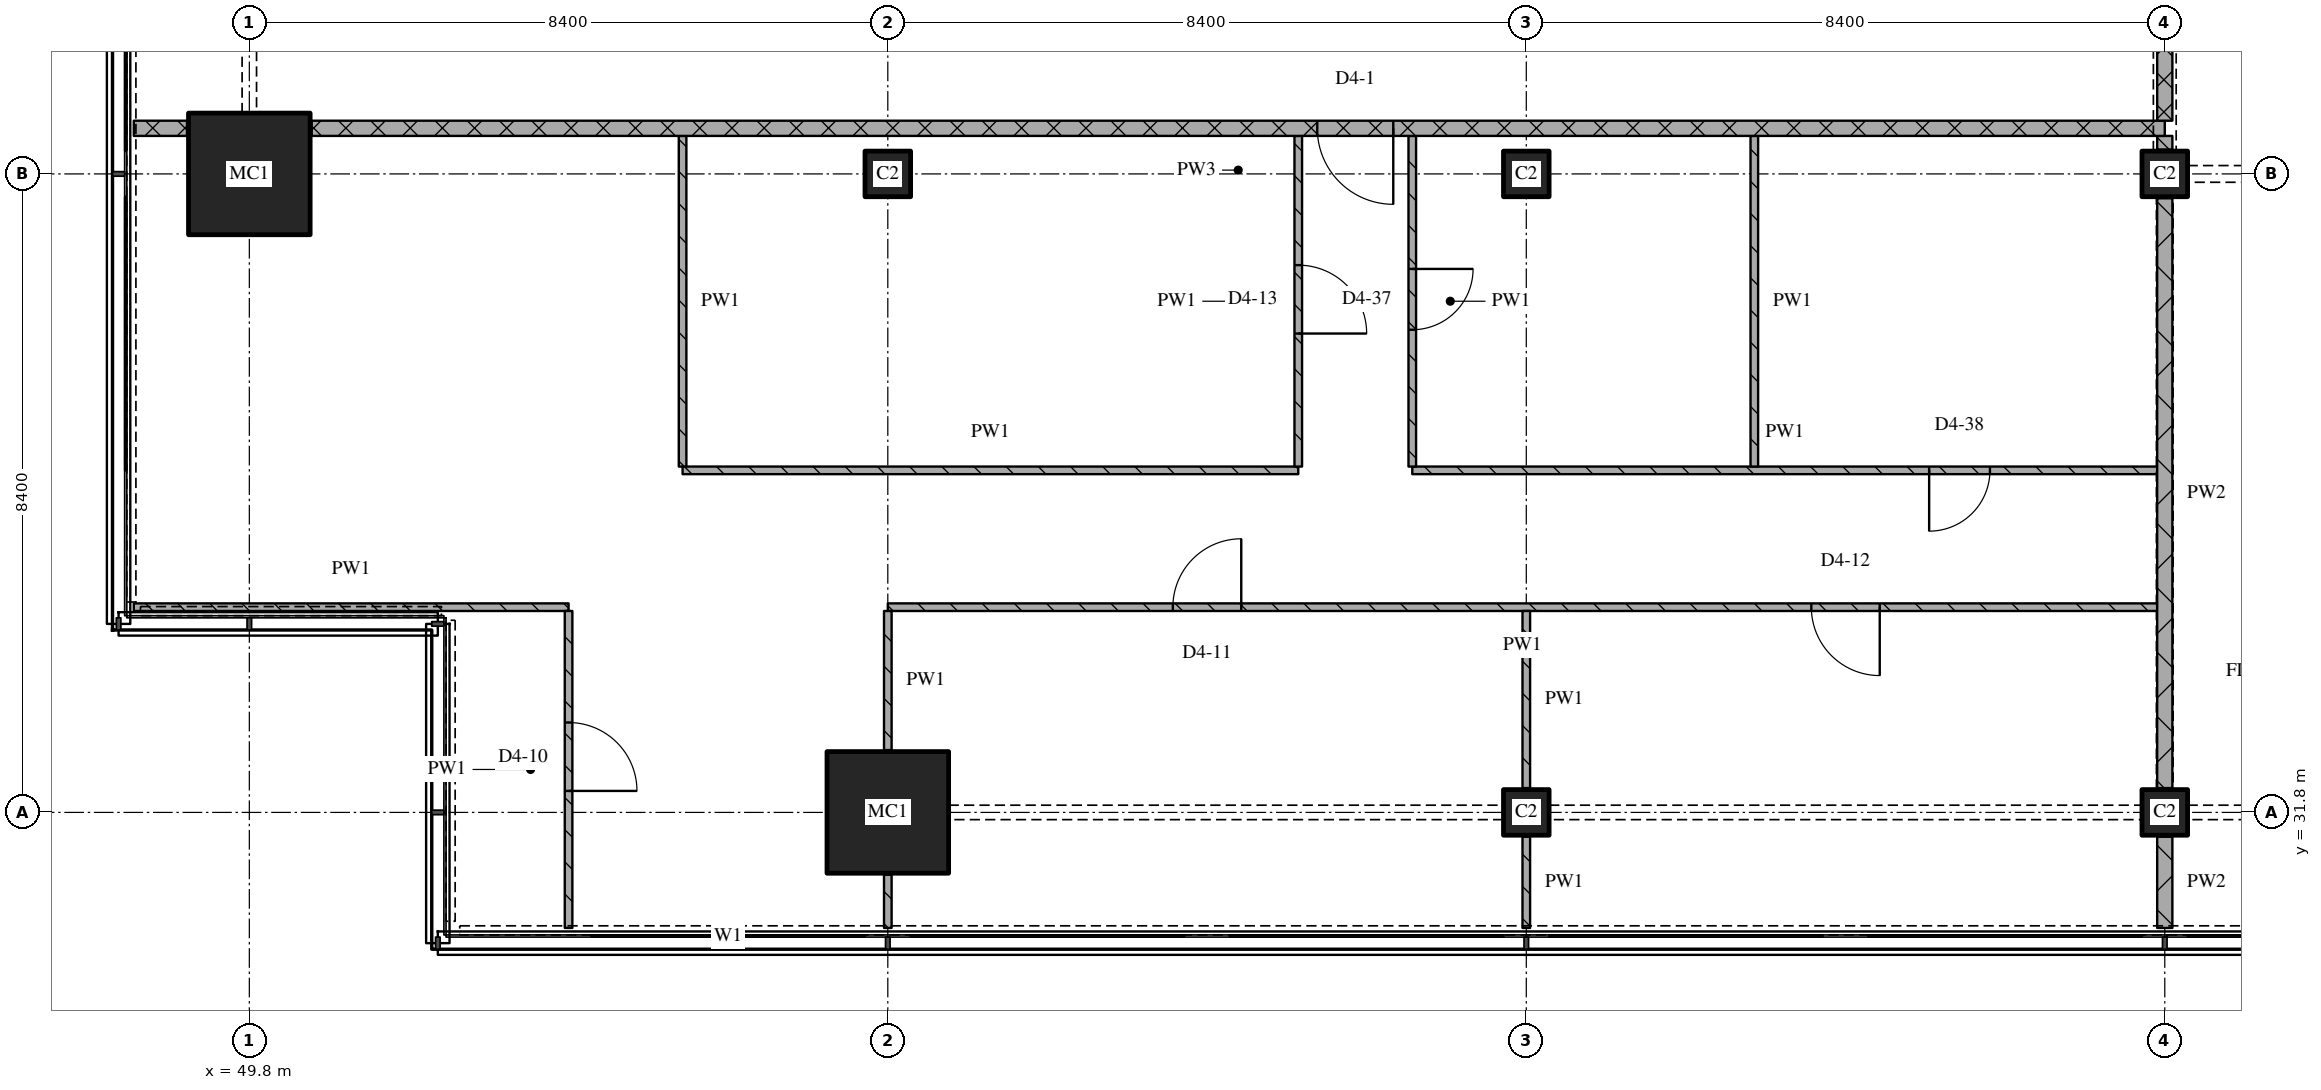
"""IFC4 building model, lengths in metres.
Left out: names, types, materials, properties, quantities, classifications, styles, units other than length and angle.
Written with IfcOpenShell. Run it as: python <this file> out.ifc"""

import sys

from ifc_helpers import new_model, si_unit, direction, frame, frame_2d, origin, origin_2d, place, context, subcontext, project, spatial, rectangle, extrude, element, fill, save


model = new_model("IFC4")
c1 = context("Model", 3, precision=1e-05, world=origin(), true_north=direction((0.0, 1.0)))
c2 = subcontext(c1, "Body", "Model", "MODEL_VIEW")
j1 = project(units=[si_unit("LENGTHUNIT", "METRE"), si_unit("PLANEANGLEUNIT", "RADIAN")], contexts=[c1])
p1 = place(None, origin())
s1 = spatial("IfcSite", under=j1, at=p1, CompositionType="ELEMENT")
p2 = place(p1, origin())
s2 = spatial("IfcBuilding", under=s1, at=p2, CompositionType="ELEMENT")
p3 = place(p2, frame((0.0, 0.0, 237.9)))
s3 = spatial("IfcBuildingStorey", under=s2, at=p3, CompositionType="ELEMENT", Elevation=237.9)
for number, where, z_axis, x_axis in (
    (1, (49.8, 40.2, 0.0), (0.0, 0.0, 1.0), (1.0, 0.0, 0.0)),
    (2, (58.2, 31.8, 0.0), (0.0, 0.0, 1.0), (1.0, 0.0, 0.0)),
):
    element("IfcColumn", number, at=place(p3, frame(where, z_axis=z_axis, x_axis=x_axis)), inside=s3, PredefinedType="COLUMN", context=c2, shape_type="SweptSolid", body=[
        extrude(rectangle(XDim=1.6, YDim=1.6, at=origin_2d()), origin(), (0.0, 0.0, 1.0), 3.6),
    ])
for number, where, z_axis, x_axis in (
    (3, (58.2, 40.2, 0.0), (0.0, 0.0, 1.0), (1.0, 0.0, 0.0)),
    (4, (66.6, 31.8, 0.0), (0.0, 0.0, 1.0), (1.0, 0.0, 0.0)),
    (5, (66.6, 40.2, 0.0), (0.0, 0.0, 1.0), (1.0, 0.0, 0.0)),
    (6, (75.0, 31.8, 0.0), (0.0, 0.0, 1.0), (1.0, 0.0, 0.0)),
    (7, (75.0, 40.2, 0.0), (0.0, 0.0, 1.0), (1.0, 0.0, 0.0)),
):
    element("IfcColumn", number, at=place(p3, frame(where, z_axis=z_axis, x_axis=x_axis)), inside=s3, PredefinedType="COLUMN", context=c2, shape_type="SweptSolid", body=[
        extrude(rectangle(XDim=0.6, YDim=0.6, at=origin_2d()), origin(), (0.0, 0.0, 1.0), 3.6),
    ])
p4 = place(p3, frame((48.28, 34.5, 0.0), z_axis=(0.0, 0.0, 1.0), x_axis=(1.0, 0.0, 0.0)))
e8 = element("IfcWall", 8, at=p4, inside=s3, PredefinedType="PARTITIONING", context=c2, shape_type="SweptSolid", body=[
    extrude(rectangle(XDim=5.72, YDim=0.1, at=frame_2d((2.86, 0.0))), origin(), (0.0, 0.0, 1.0), 3.32),
])
p5 = place(p3, frame((74.9, 34.5, 0.0), z_axis=(0.0, 0.0, 1.0), x_axis=(-1.0, 0.0, 0.0)))
e9 = element("IfcWall", 9, at=p5, inside=s3, PredefinedType="PARTITIONING", context=c2, shape_type="SweptSolid", body=[
    extrude(rectangle(XDim=16.7, YDim=0.1, at=frame_2d((8.35, 0.0))), origin(), (0.0, 0.0, 1.0), 3.32),
])
p6 = place(p5, frame((3.65, 0.0, 0.0)))
e10 = element("IfcOpeningElement", 10, at=p6, cuts=e9, PredefinedType="OPENING", context=c2, shape_type="SweptSolid", body=[
    extrude(rectangle(XDim=0.9, YDim=2.1, at=frame_2d((0.45, 1.05))), frame((0.0, 0.06, 0.0), z_axis=(0.0, -1.0, 0.0), x_axis=(1.0, 0.0, 0.0)), (0.0, 0.0, 1.0), 0.12),
])
p7 = place(p5, frame((12.05, 0.0, 0.0)))
e11 = element("IfcOpeningElement", 11, at=p7, cuts=e9, PredefinedType="OPENING", context=c2, shape_type="SweptSolid", body=[
    extrude(rectangle(XDim=0.9, YDim=2.1, at=frame_2d((0.45, 1.05))), frame((0.0, 0.06, 0.0), z_axis=(0.0, -1.0, 0.0), x_axis=(1.0, 0.0, 0.0)), (0.0, 0.0, 1.0), 0.12),
])
p8 = place(p3, frame((55.5, 36.3, 0.0), z_axis=(0.0, 0.0, 1.0), x_axis=(1.0, 0.0, 0.0)))
e12 = element("IfcWall", 12, at=p8, inside=s3, PredefinedType="PARTITIONING", context=c2, shape_type="SweptSolid", body=[
    extrude(rectangle(XDim=8.1, YDim=0.1, at=frame_2d((4.05, 0.0))), origin(), (0.0, 0.0, 1.0), 3.32),
])
p9 = place(p3, frame((65.1, 36.3, 0.0), z_axis=(0.0, 0.0, 1.0), x_axis=(1.0, 0.0, 0.0)))
e13 = element("IfcWall", 13, at=p9, inside=s3, PredefinedType="PARTITIONING", context=c2, shape_type="SweptSolid", body=[
    extrude(rectangle(XDim=9.8, YDim=0.1, at=frame_2d((4.9, 0.0))), origin(), (0.0, 0.0, 1.0), 3.32),
])
p10 = place(p9, frame((6.8, 0.0, 0.0)))
e14 = element("IfcOpeningElement", 14, at=p10, cuts=e13, PredefinedType="OPENING", context=c2, shape_type="SweptSolid", body=[
    extrude(rectangle(XDim=0.8, YDim=2.1, at=frame_2d((0.4, 1.05))), frame((0.0, 0.06, 0.0), z_axis=(0.0, -1.0, 0.0), x_axis=(1.0, 0.0, 0.0)), (0.0, 0.0, 1.0), 0.12),
])
p11 = place(p3, frame((48.28, 40.8, 0.0), z_axis=(0.0, 0.0, 1.0), x_axis=(1.0, 0.0, 0.0)))
e15 = element("IfcWall", 15, at=p11, inside=s3, PredefinedType="PARTITIONING", context=c2, shape_type="SweptSolid", body=[
    extrude(rectangle(XDim=0.7, YDim=0.2, at=frame_2d((0.35, 0.0))), origin(), (0.0, 0.0, 1.0), 3.32),
])
p12 = place(p3, frame((75.0, 40.8, 0.0), z_axis=(0.0, 0.0, 1.0), x_axis=(-1.0, 0.0, 0.0)))
e16 = element("IfcWall", 16, at=p12, inside=s3, PredefinedType="PARTITIONING", context=c2, shape_type="SweptSolid", body=[
    extrude(rectangle(XDim=24.38, YDim=0.2, at=frame_2d((12.19, 0.0))), origin(), (0.0, 0.0, 1.0), 3.32),
])
p13 = place(p12, frame((10.15, 0.0, 0.0)))
e17 = element("IfcOpeningElement", 17, at=p13, cuts=e16, PredefinedType="OPENING", context=c2, shape_type="SweptSolid", body=[
    extrude(rectangle(XDim=1.0, YDim=2.1, at=frame_2d((0.5, 1.05))), frame((0.0, 0.11, 0.0), z_axis=(0.0, -1.0, 0.0), x_axis=(1.0, 0.0, 0.0)), (0.0, 0.0, 1.0), 0.22),
])
p14 = place(p3, frame((54.0, 30.28, 0.0), z_axis=(0.0, 0.0, 1.0), x_axis=(0.0, 1.0, 0.0)))
e18 = element("IfcWall", 18, at=p14, inside=s3, PredefinedType="PARTITIONING", context=c2, shape_type="SweptSolid", body=[
    extrude(rectangle(XDim=4.17, YDim=0.1, at=frame_2d((2.085, 0.0))), origin(), (0.0, 0.0, 1.0), 3.32),
])
p15 = place(p14, frame((1.803, 0.0, 0.0)))
e19 = element("IfcOpeningElement", 19, at=p15, cuts=e18, PredefinedType="OPENING", context=c2, shape_type="SweptSolid", body=[
    extrude(rectangle(XDim=0.9, YDim=2.1, at=frame_2d((0.45, 1.05))), frame((0.0, 0.06, 0.0), z_axis=(0.0, -1.0, 0.0), x_axis=(1.0, 0.0, 0.0)), (0.0, 0.0, 1.0), 0.12),
])
p16 = place(p3, frame((55.5, 40.7, 0.0), z_axis=(0.0, 0.0, 1.0), x_axis=(0.0, -1.0, 0.0)))
e20 = element("IfcWall", 20, at=p16, inside=s3, PredefinedType="PARTITIONING", context=c2, shape_type="SweptSolid", body=[
    extrude(rectangle(XDim=4.35, YDim=0.1, at=frame_2d((2.175, 0.0))), origin(), (0.0, 0.0, 1.0), 3.32),
])
p17 = place(p3, frame((58.2, 30.98, 0.0), z_axis=(0.0, 0.0, 1.0), x_axis=(0.0, -1.0, 0.0)))
e21 = element("IfcWall", 21, at=p17, inside=s3, PredefinedType="PARTITIONING", context=c2, shape_type="SweptSolid", body=[
    extrude(rectangle(XDim=0.7, YDim=0.1, at=frame_2d((0.35, 0.0))), origin(), (0.0, 0.0, 1.0), 3.32),
])
p18 = place(p3, frame((58.2, 34.45, 0.0), z_axis=(0.0, 0.0, 1.0), x_axis=(0.0, -1.0, 0.0)))
e22 = element("IfcWall", 22, at=p18, inside=s3, PredefinedType="PARTITIONING", context=c2, shape_type="SweptSolid", body=[
    extrude(rectangle(XDim=1.83, YDim=0.1, at=frame_2d((0.915, 0.0))), origin(), (0.0, 0.0, 1.0), 3.32),
])
p19 = place(p3, frame((63.6, 36.35, 0.0), z_axis=(0.0, 0.0, 1.0), x_axis=(0.0, 1.0, 0.0)))
e23 = element("IfcWall", 23, at=p19, inside=s3, PredefinedType="PARTITIONING", context=c2, shape_type="SweptSolid", body=[
    extrude(rectangle(XDim=4.35, YDim=0.1, at=frame_2d((2.175, 0.0))), origin(), (0.0, 0.0, 1.0), 3.32),
])
p20 = place(p19, frame((1.75, 0.0, 0.0)))
e24 = element("IfcOpeningElement", 24, at=p20, cuts=e23, PredefinedType="OPENING", context=c2, shape_type="SweptSolid", body=[
    extrude(rectangle(XDim=0.9, YDim=2.1, at=frame_2d((0.45, 1.05))), frame((0.0, 0.06, 0.0), z_axis=(0.0, -1.0, 0.0), x_axis=(1.0, 0.0, 0.0)), (0.0, 0.0, 1.0), 0.12),
])
p21 = place(p3, frame((65.1, 40.7, 0.0), z_axis=(0.0, 0.0, 1.0), x_axis=(0.0, -1.0, 0.0)))
e25 = element("IfcWall", 25, at=p21, inside=s3, PredefinedType="PARTITIONING", context=c2, shape_type="SweptSolid", body=[
    extrude(rectangle(XDim=4.35, YDim=0.1, at=frame_2d((2.175, 0.0))), origin(), (0.0, 0.0, 1.0), 3.32),
])
p22 = place(p21, frame((1.75, 0.0, 0.0)))
e26 = element("IfcOpeningElement", 26, at=p22, cuts=e25, PredefinedType="OPENING", context=c2, shape_type="SweptSolid", body=[
    extrude(rectangle(XDim=0.8, YDim=2.1, at=frame_2d((0.4, 1.05))), frame((0.0, 0.06, 0.0), z_axis=(0.0, -1.0, 0.0), x_axis=(1.0, 0.0, 0.0)), (0.0, 0.0, 1.0), 0.12),
])
p23 = place(p3, frame((66.6, 31.48, 0.0), z_axis=(0.0, 0.0, 1.0), x_axis=(0.0, -1.0, 0.0)))
e27 = element("IfcWall", 27, at=p23, inside=s3, PredefinedType="PARTITIONING", context=c2, shape_type="SweptSolid", body=[
    extrude(rectangle(XDim=1.2, YDim=0.1, at=frame_2d((0.6, 0.0))), origin(), (0.0, 0.0, 1.0), 3.32),
])
p24 = place(p3, frame((66.6, 34.45, 0.0), z_axis=(0.0, 0.0, 1.0), x_axis=(0.0, -1.0, 0.0)))
e28 = element("IfcWall", 28, at=p24, inside=s3, PredefinedType="PARTITIONING", context=c2, shape_type="SweptSolid", body=[
    extrude(rectangle(XDim=2.33, YDim=0.1, at=frame_2d((1.165, 0.0))), origin(), (0.0, 0.0, 1.0), 3.32),
])
p25 = place(p3, frame((69.6, 40.7, 0.0), z_axis=(0.0, 0.0, 1.0), x_axis=(0.0, -1.0, 0.0)))
e29 = element("IfcWall", 29, at=p25, inside=s3, PredefinedType="PARTITIONING", context=c2, shape_type="SweptSolid", body=[
    extrude(rectangle(XDim=4.35, YDim=0.1, at=frame_2d((2.175, 0.0))), origin(), (0.0, 0.0, 1.0), 3.32),
])
p26 = place(p3, frame((75.0, 43.1, 0.0), z_axis=(0.0, 0.0, 1.0), x_axis=(0.0, -1.0, 0.0)))
e30 = element("IfcWall", 30, at=p26, inside=s3, PredefinedType="PARTITIONING", context=c2, shape_type="SweptSolid", body=[
    extrude(rectangle(XDim=2.2, YDim=0.2, at=frame_2d((1.1, 0.0))), origin(), (0.0, 0.0, 1.0), 2.53),
])
p27 = place(p3, frame((75.0, 31.48, 0.0), z_axis=(0.0, 0.0, 1.0), x_axis=(0.0, -1.0, 0.0)))
e31 = element("IfcWall", 31, at=p27, inside=s3, PredefinedType="PARTITIONING", context=c2, shape_type="SweptSolid", body=[
    extrude(rectangle(XDim=1.2, YDim=0.2, at=frame_2d((0.6, 0.0))), origin(), (0.0, 0.0, 1.0), 3.32),
])
p28 = place(p3, frame((75.0, 39.88, 0.0), z_axis=(0.0, 0.0, 1.0), x_axis=(0.0, -1.0, 0.0)))
e32 = element("IfcWall", 32, at=p28, inside=s3, PredefinedType="PARTITIONING", context=c2, shape_type="SweptSolid", body=[
    extrude(rectangle(XDim=7.76, YDim=0.2, at=frame_2d((3.88, 0.0))), origin(), (0.0, 0.0, 1.0), 2.72),
])
p29 = place(p3, frame((75.0, 40.7, 0.0), z_axis=(0.0, 0.0, 1.0), x_axis=(0.0, -1.0, 0.0)))
e33 = element("IfcWall", 33, at=p29, inside=s3, PredefinedType="PARTITIONING", context=c2, shape_type="SweptSolid", body=[
    extrude(rectangle(XDim=0.18, YDim=0.2, at=frame_2d((0.09, 0.0))), origin(), (0.0, 0.0, 1.0), 3.32),
])
p30 = place(p6, origin())
e34 = element("IfcDoor", 34, at=p30, inside=s3, OperationType="SINGLE_SWING_LEFT", PredefinedType="DOOR", context=c2, shape_type="SweptSolid", body=[
    extrude(rectangle(XDim=0.9, YDim=2.1, at=frame_2d((0.45, 1.05))), frame((0.0, 0.025, 0.0), z_axis=(0.0, -1.0, 0.0), x_axis=(1.0, 0.0, 0.0)), (0.0, 0.0, 1.0), 0.05),
])
fill(e10, e34)
p31 = place(p7, origin())
e35 = element("IfcDoor", 35, at=p31, inside=s3, OperationType="SINGLE_SWING_RIGHT", PredefinedType="DOOR", context=c2, shape_type="SweptSolid", body=[
    extrude(rectangle(XDim=0.9, YDim=2.1, at=frame_2d((0.45, 1.05))), frame((0.0, 0.025, 0.0), z_axis=(0.0, -1.0, 0.0), x_axis=(1.0, 0.0, 0.0)), (0.0, 0.0, 1.0), 0.05),
])
fill(e11, e35)
p32 = place(p10, origin())
e36 = element("IfcDoor", 36, at=p32, inside=s3, OperationType="SINGLE_SWING_RIGHT", PredefinedType="DOOR", context=c2, shape_type="SweptSolid", body=[
    extrude(rectangle(XDim=0.8, YDim=2.1, at=frame_2d((0.4, 1.05))), frame((0.0, 0.025, 0.0), z_axis=(0.0, -1.0, 0.0), x_axis=(1.0, 0.0, 0.0)), (0.0, 0.0, 1.0), 0.05),
])
fill(e14, e36)
p33 = place(p13, origin())
e37 = element("IfcDoor", 37, at=p33, inside=s3, OperationType="SINGLE_SWING_LEFT", PredefinedType="DOOR", context=c2, shape_type="SweptSolid", body=[
    extrude(rectangle(XDim=1.0, YDim=2.1, at=frame_2d((0.5, 1.05))), frame((0.0, 0.025, 0.0), z_axis=(0.0, -1.0, 0.0), x_axis=(1.0, 0.0, 0.0)), (0.0, 0.0, 1.0), 0.05),
])
fill(e17, e37)
p34 = place(p15, origin())
e38 = element("IfcDoor", 38, at=p34, inside=s3, OperationType="SINGLE_SWING_RIGHT", PredefinedType="DOOR", context=c2, shape_type="SweptSolid", body=[
    extrude(rectangle(XDim=0.9, YDim=2.1, at=frame_2d((0.45, 1.05))), frame((0.0, 0.025, 0.0), z_axis=(0.0, -1.0, 0.0), x_axis=(1.0, 0.0, 0.0)), (0.0, 0.0, 1.0), 0.05),
])
fill(e19, e38)
p35 = place(p20, origin())
e39 = element("IfcDoor", 39, at=p35, inside=s3, OperationType="SINGLE_SWING_RIGHT", PredefinedType="DOOR", context=c2, shape_type="SweptSolid", body=[
    extrude(rectangle(XDim=0.9, YDim=2.1, at=frame_2d((0.45, 1.05))), frame((0.0, 0.025, 0.0), z_axis=(0.0, -1.0, 0.0), x_axis=(1.0, 0.0, 0.0)), (0.0, 0.0, 1.0), 0.05),
])
fill(e24, e39)
p36 = place(p22, origin())
e40 = element("IfcDoor", 40, at=p36, inside=s3, OperationType="SINGLE_SWING_LEFT", PredefinedType="DOOR", context=c2, shape_type="SweptSolid", body=[
    extrude(rectangle(XDim=0.8, YDim=2.1, at=frame_2d((0.4, 1.05))), frame((0.0, 0.025, 0.0), z_axis=(0.0, -1.0, 0.0), x_axis=(1.0, 0.0, 0.0)), (0.0, 0.0, 1.0), 0.05),
])
fill(e26, e40)
save(model, sys.argv[1])
